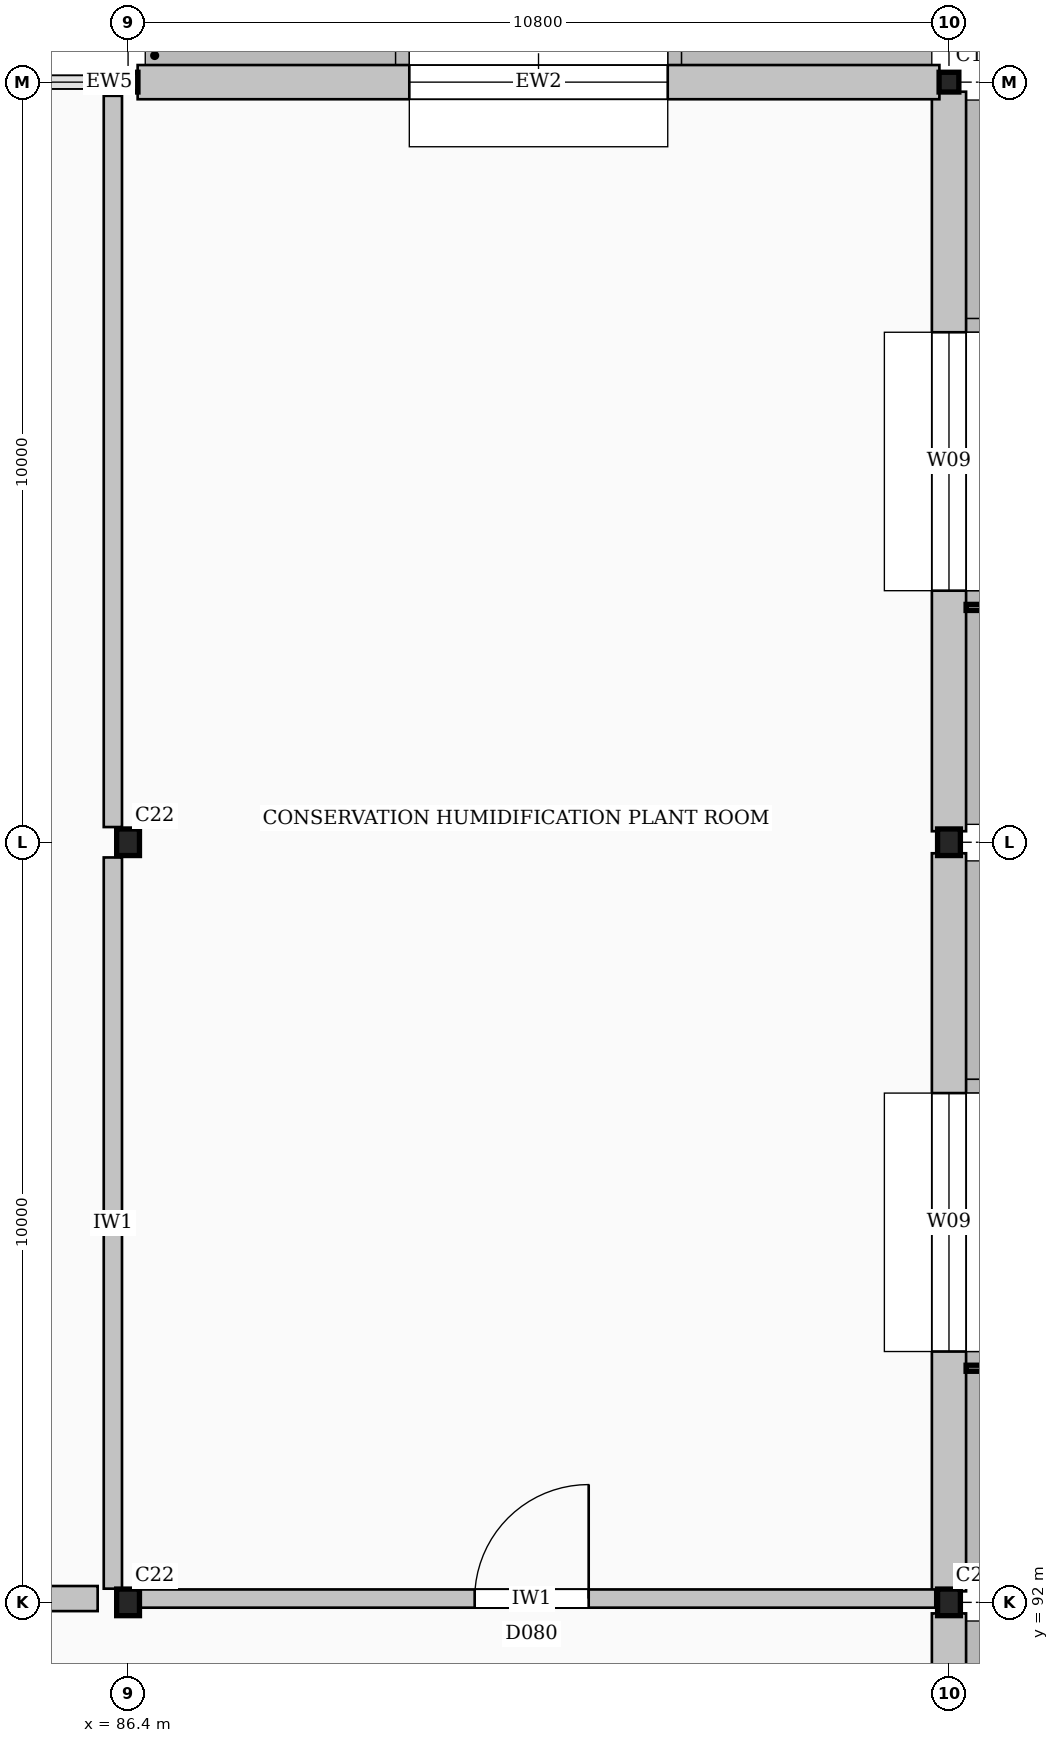
"""IFC4 building model, lengths in metres.
Left out: names, types, materials, properties, quantities, classifications, styles, units other than length and angle.
Written with IfcOpenShell. Run it as: python <this file> out.ifc"""

import sys

from ifc_helpers import new_model, si_unit, direction, frame, frame_2d, origin, origin_2d, place, context, subcontext, project, spatial, rectangle, hollow_rectangle, i_section, extrude, element, fill, save


model = new_model("IFC4")
c1 = context("Model", 3, precision=1e-05, world=origin(), true_north=direction((0.0, 1.0)))
c2 = subcontext(c1, "Body", "Model", "MODEL_VIEW")
j1 = project(units=[si_unit("LENGTHUNIT", "METRE"), si_unit("PLANEANGLEUNIT", "RADIAN")], contexts=[c1])
p1 = place(None, origin())
s1 = spatial("IfcSite", under=j1, at=p1, CompositionType="ELEMENT")
p2 = place(p1, origin())
s2 = spatial("IfcBuilding", under=s1, at=p2, CompositionType="ELEMENT")
p3 = place(p2, frame((0.0, 0.0, 14.4)))
s3 = spatial("IfcBuildingStorey", under=s2, at=p3, CompositionType="ELEMENT", Elevation=14.4)
for number, where, z_axis, x_axis in (
    (1, (86.4, 92.0, 0.0), (0.0, 0.0, 1.0), (1.0, 0.0, 0.0)),
    (2, (86.4, 102.0, 0.0), (0.0, 0.0, 1.0), (1.0, 0.0, 0.0)),
):
    element("IfcColumn", number, at=place(p3, frame(where, z_axis=z_axis, x_axis=x_axis)), inside=s3, PredefinedType="COLUMN", context=c2, shape_type="SweptSolid", body=[
        extrude(i_section(OverallWidth=0.3, OverallDepth=0.35, WebThickness=0.01, FlangeThickness=0.018, FilletRadius=0.027, at=origin_2d()), origin(), (0.0, 0.0, 1.0), 9.6),
    ])
p4 = place(p3, frame((86.4, 112.0, 0.0), z_axis=(0.0, 0.0, 1.0), x_axis=(1.0, 0.0, 0.0)))
e3 = element("IfcColumn", 3, at=p4, inside=s3, PredefinedType="COLUMN", context=c2, shape_type="SweptSolid", body=[
    extrude(hollow_rectangle(XDim=0.26, YDim=0.26, WallThickness=0.014, InnerFilletRadius=0.014, OuterFilletRadius=0.028, at=origin_2d()), origin(), (0.0, 0.0, 1.0), 9.6),
])
for number, where, z_axis, x_axis in (
    (4, (97.2, 92.0, 0.0), (0.0, 0.0, 1.0), (1.0, 0.0, 0.0)),
    (5, (97.2, 102.0, 0.0), (0.0, 0.0, 1.0), (1.0, 0.0, 0.0)),
):
    element("IfcColumn", number, at=place(p3, frame(where, z_axis=z_axis, x_axis=x_axis)), inside=s3, PredefinedType="COLUMN", context=c2, shape_type="SweptSolid", body=[
        extrude(i_section(OverallWidth=0.3, OverallDepth=0.35, WebThickness=0.01, FlangeThickness=0.018, FilletRadius=0.027, at=origin_2d()), origin(), (0.0, 0.0, 1.0), 9.6),
    ])
p5 = place(p3, frame((97.2, 112.0, 0.0), z_axis=(0.0, 0.0, 1.0), x_axis=(1.0, 0.0, 0.0)))
e6 = element("IfcColumn", 6, at=p5, inside=s3, PredefinedType="COLUMN", context=c2, shape_type="SweptSolid", body=[
    extrude(hollow_rectangle(XDim=0.26, YDim=0.26, WallThickness=0.014, InnerFilletRadius=0.014, OuterFilletRadius=0.028, at=origin_2d()), origin(), (0.0, 0.0, 1.0), 9.6),
])
p6 = place(p3, frame((97.2, 82.145, 0.0), z_axis=(0.0, 0.0, 1.0), x_axis=(0.0, 1.0, 0.0)))
e7 = element("IfcWall", 7, at=p6, inside=s3, PredefinedType="STANDARD", context=c2, shape_type="SweptSolid", body=[
    extrude(rectangle(XDim=9.71, YDim=0.45, at=frame_2d((4.855, 0.0))), origin(), (0.0, 0.0, 1.0), 9.36),
])
p7 = place(p6, frame((3.155, 0.0, 1.1)))
e8 = element("IfcOpeningElement", 8, at=p7, cuts=e7, PredefinedType="OPENING", context=c2, shape_type="SweptSolid", body=[
    extrude(rectangle(XDim=3.4, YDim=5.8, at=frame_2d((1.7, 2.9))), frame((0.0, 0.235, 0.0), z_axis=(0.0, -1.0, 0.0), x_axis=(1.0, 0.0, 0.0)), (0.0, 0.0, 1.0), 0.47),
])
p8 = place(p3, frame((97.2, 92.145, 0.0), z_axis=(0.0, 0.0, 1.0), x_axis=(0.0, 1.0, 0.0)))
e9 = element("IfcWall", 9, at=p8, inside=s3, PredefinedType="STANDARD", context=c2, shape_type="SweptSolid", body=[
    extrude(rectangle(XDim=9.71, YDim=0.45, at=frame_2d((4.855, 0.0))), origin(), (0.0, 0.0, 1.0), 9.36),
])
p9 = place(p8, frame((3.155, 0.0, 1.1)))
e10 = element("IfcOpeningElement", 10, at=p9, cuts=e9, PredefinedType="OPENING", context=c2, shape_type="SweptSolid", body=[
    extrude(rectangle(XDim=3.4, YDim=5.8, at=frame_2d((1.7, 2.9))), frame((0.0, 0.235, 0.0), z_axis=(0.0, -1.0, 0.0), x_axis=(1.0, 0.0, 0.0)), (0.0, 0.0, 1.0), 0.47),
])
p10 = place(p3, frame((97.2, 102.145, 0.0), z_axis=(0.0, 0.0, 1.0), x_axis=(0.0, 1.0, 0.0)))
e11 = element("IfcWall", 11, at=p10, inside=s3, PredefinedType="STANDARD", context=c2, shape_type="SweptSolid", body=[
    extrude(rectangle(XDim=9.729, YDim=0.45, at=frame_2d((4.865, 0.0))), origin(), (0.0, 0.0, 1.0), 9.36),
])
p11 = place(p10, frame((3.165, 0.0, 1.1)))
e12 = element("IfcOpeningElement", 12, at=p11, cuts=e11, PredefinedType="OPENING", context=c2, shape_type="SweptSolid", body=[
    extrude(rectangle(XDim=3.4, YDim=5.8, at=frame_2d((1.7, 2.9))), frame((0.0, 0.235, 0.0), z_axis=(0.0, -1.0, 0.0), x_axis=(1.0, 0.0, 0.0)), (0.0, 0.0, 1.0), 0.47),
])
p12 = place(p3, frame((97.074, 112.0, 0.0), z_axis=(0.0, 0.0, 1.0), x_axis=(-1.0, 0.0, 0.0)))
e13 = element("IfcWall", 13, at=p12, inside=s3, PredefinedType="STANDARD", context=c2, shape_type="SweptSolid", body=[
    extrude(rectangle(XDim=10.548, YDim=0.45, at=frame_2d((5.274, 0.0))), origin(), (0.0, 0.0, 1.0), 8.91),
])
p13 = place(p12, frame((3.574, 0.0, 1.1)))
e14 = element("IfcOpeningElement", 14, at=p13, cuts=e13, PredefinedType="OPENING", context=c2, shape_type="SweptSolid", body=[
    extrude(rectangle(XDim=3.4, YDim=5.8, at=frame_2d((1.7, 2.9))), frame((0.0, 0.235, 0.0), z_axis=(0.0, -1.0, 0.0), x_axis=(1.0, 0.0, 0.0)), (0.0, 0.0, 1.0), 0.47),
])
p14 = place(p3, frame((86.274, 112.0, 0.0), z_axis=(0.0, 0.0, 1.0), x_axis=(-1.0, 0.0, 0.0)))
e15 = element("IfcWall", 15, at=p14, inside=s3, PredefinedType="STANDARD", context=c2, shape_type="SweptSolid", body=[
    extrude(rectangle(XDim=0.244, YDim=0.3, at=frame_2d((0.122, 0.0))), origin(), (0.0, 0.0, 1.0), 9.36),
])
p15 = place(p3, frame((75.8, 92.05, 0.0), z_axis=(0.0, 0.0, 1.0), x_axis=(1.0, 0.0, 0.0)))
e16 = element("IfcWall", 16, at=p15, inside=s3, PredefinedType="PARTITIONING", context=c2, shape_type="SweptSolid", body=[
    extrude(rectangle(XDim=10.2, YDim=0.33, at=frame_2d((5.1, 0.0))), origin(), (0.0, 0.0, 1.0), 8.92),
])
p16 = place(p3, frame((86.4, 92.05, 0.0), z_axis=(0.0, 0.0, 1.0), x_axis=(1.0, 0.0, 0.0)))
e17 = element("IfcWall", 17, at=p16, inside=s3, PredefinedType="SOLIDWALL", context=c2, shape_type="SweptSolid", body=[
    extrude(rectangle(XDim=10.62, YDim=0.24, at=frame_2d((5.31, 0.0))), origin(), (0.0, 0.0, 1.0), 8.91),
])
p17 = place(p16, frame((4.56, 0.0, 0.0)))
e18 = element("IfcOpeningElement", 18, at=p17, cuts=e17, PredefinedType="OPENING", context=c2, shape_type="SweptSolid", body=[
    extrude(rectangle(XDim=1.5, YDim=2.3, at=frame_2d((0.75, 1.15))), frame((0.0, 0.13, 0.0), z_axis=(0.0, -1.0, 0.0), x_axis=(1.0, 0.0, 0.0)), (0.0, 0.0, 1.0), 0.26),
])
for number, where, z_axis, x_axis in (
    (19, (86.2, 92.18, 0.0), (0.0, 0.0, 1.0), (0.0, 1.0, 0.0)),
    (20, (86.2, 102.2, 0.0), (0.0, 0.0, 1.0), (0.0, 1.0, 0.0)),
):
    element("IfcWall", number, at=place(p3, frame(where, z_axis=z_axis, x_axis=x_axis)), inside=s3, PredefinedType="SOLIDWALL", context=c2, shape_type="SweptSolid", body=[
        extrude(rectangle(XDim=9.62, YDim=0.24, at=frame_2d((4.81, 0.0))), origin(), (0.0, 0.0, 1.0), 9.32),
    ])
p18 = place(p9, origin())
e21 = element("IfcWindow", 21, at=p18, inside=s3, PartitioningType="SINGLE_PANEL", PredefinedType="WINDOW", context=c2, shape_type="SweptSolid", body=[
    extrude(rectangle(XDim=3.4, YDim=5.8, at=frame_2d((1.7, 2.9))), frame((0.0, 0.03, 0.0), z_axis=(0.0, -1.0, 0.0), x_axis=(1.0, 0.0, 0.0)), (0.0, 0.0, 1.0), 0.06),
])
fill(e10, e21)
p19 = place(p11, origin())
e22 = element("IfcWindow", 22, at=p19, inside=s3, PartitioningType="SINGLE_PANEL", PredefinedType="WINDOW", context=c2, shape_type="SweptSolid", body=[
    extrude(rectangle(XDim=3.4, YDim=5.8, at=frame_2d((1.7, 2.9))), frame((0.0, 0.03, 0.0), z_axis=(0.0, -1.0, 0.0), x_axis=(1.0, 0.0, 0.0)), (0.0, 0.0, 1.0), 0.06),
])
fill(e12, e22)
p20 = place(p13, origin())
e23 = element("IfcWindow", 23, at=p20, inside=s3, PartitioningType="SINGLE_PANEL", PredefinedType="WINDOW", context=c2, shape_type="SweptSolid", body=[
    extrude(rectangle(XDim=3.4, YDim=5.8, at=frame_2d((1.7, 2.9))), frame((0.0, 0.03, 0.0), z_axis=(0.0, -1.0, 0.0), x_axis=(1.0, 0.0, 0.0)), (0.0, 0.0, 1.0), 0.06),
])
fill(e14, e23)
p21 = place(p17, origin())
e24 = element("IfcDoor", 24, at=p21, inside=s3, OperationType="SINGLE_SWING_RIGHT", PredefinedType="DOOR", context=c2, shape_type="SweptSolid", body=[
    extrude(rectangle(XDim=1.5, YDim=2.3, at=frame_2d((0.75, 1.15))), frame((0.0, 0.025, 0.0), z_axis=(0.0, -1.0, 0.0), x_axis=(1.0, 0.0, 0.0)), (0.0, 0.0, 1.0), 0.05),
])
fill(e18, e24)
save(model, sys.argv[1])
